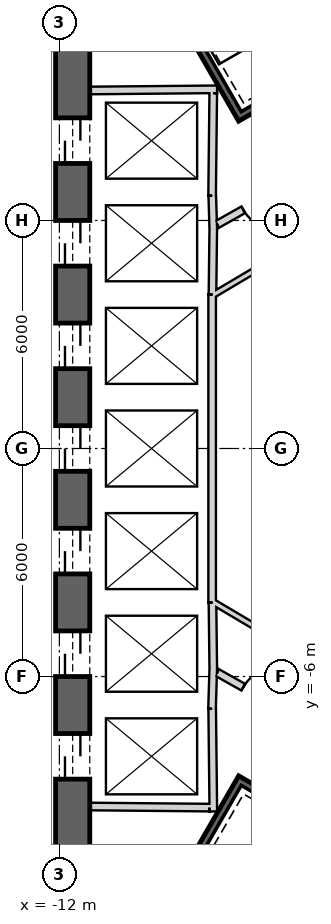
"""IFC4 building model, lengths in metres.
Left out: names, types, materials, properties, quantities, classifications, styles, units other than length and angle.
Written with IfcOpenShell. Run it as: python <this file> out.ifc"""

import sys

from ifc_helpers import new_model, si_unit, direction, frame, frame_2d, origin, place, context, subcontext, project, spatial, rectangle, extrude, element, fill, save


model = new_model("IFC4")
c1 = context("Model", 3, precision=1e-05, world=origin(), true_north=direction((0.0, 1.0)))
c2 = subcontext(c1, "Body", "Model", "MODEL_VIEW")
j1 = project(units=[si_unit("LENGTHUNIT", "METRE"), si_unit("PLANEANGLEUNIT", "RADIAN")], contexts=[c1])
p1 = place(None, origin())
s1 = spatial("IfcSite", under=j1, at=p1, CompositionType="ELEMENT")
p2 = place(p1, origin())
s2 = spatial("IfcBuilding", under=s1, at=p2, CompositionType="ELEMENT")
p3 = place(p2, frame((0.0, 0.0, 27.5)))
s3 = spatial("IfcBuildingStorey", under=s2, at=p3, CompositionType="ELEMENT", Elevation=27.5)
p4 = place(p3, frame((19.475, 2.208, 0.0), z_axis=(0.0, 0.0, 1.0), x_axis=(-0.866028369851, 0.499994862586, 0.0)))
e1 = element("IfcWall", 1, at=p4, inside=s3, PredefinedType="SHEAR", context=c2, shape_type="SweptSolid", body=[
    extrude(rectangle(XDim=31.523, YDim=0.9, at=frame_2d((15.762, 0.0))), origin(), (0.0, 0.0, 1.0), 6.0),
])
p5 = place(p4, frame((7.062, 0.0, 0.0)))
e2 = element("IfcOpeningElement", 2, at=p5, cuts=e1, PredefinedType="OPENING", context=c2, shape_type="SweptSolid", body=[
    extrude(rectangle(XDim=1.2, YDim=2.4, at=frame_2d((0.6, 1.2))), frame((0.0, 0.46, 0.0), z_axis=(0.0, -1.0, 0.0), x_axis=(1.0, 0.0, 0.0)), (0.0, 0.0, 1.0), 0.92),
])
p6 = place(p4, frame((9.762, 0.0, 0.0)))
e3 = element("IfcOpeningElement", 3, at=p6, cuts=e1, PredefinedType="OPENING", context=c2, shape_type="SweptSolid", body=[
    extrude(rectangle(XDim=1.2, YDim=2.4, at=frame_2d((0.6, 1.2))), frame((0.0, 0.46, 0.0), z_axis=(0.0, -1.0, 0.0), x_axis=(1.0, 0.0, 0.0)), (0.0, 0.0, 1.0), 0.92),
])
p7 = place(p4, frame((12.462, 0.0, 0.0)))
e4 = element("IfcOpeningElement", 4, at=p7, cuts=e1, PredefinedType="OPENING", context=c2, shape_type="SweptSolid", body=[
    extrude(rectangle(XDim=1.2, YDim=2.4, at=frame_2d((0.6, 1.2))), frame((0.0, 0.46, 0.0), z_axis=(0.0, -1.0, 0.0), x_axis=(1.0, 0.0, 0.0)), (0.0, 0.0, 1.0), 0.92),
])
p8 = place(p4, frame((15.162, 0.0, 0.0)))
e5 = element("IfcOpeningElement", 5, at=p8, cuts=e1, PredefinedType="OPENING", context=c2, shape_type="SweptSolid", body=[
    extrude(rectangle(XDim=1.2, YDim=2.4, at=frame_2d((0.6, 1.2))), frame((0.0, 0.46, 0.0), z_axis=(0.0, -1.0, 0.0), x_axis=(1.0, 0.0, 0.0)), (0.0, 0.0, 1.0), 0.92),
])
p9 = place(p4, frame((17.862, 0.0, 0.0)))
e6 = element("IfcOpeningElement", 6, at=p9, cuts=e1, PredefinedType="OPENING", context=c2, shape_type="SweptSolid", body=[
    extrude(rectangle(XDim=1.2, YDim=2.4, at=frame_2d((0.6, 1.2))), frame((0.0, 0.46, 0.0), z_axis=(0.0, -1.0, 0.0), x_axis=(1.0, 0.0, 0.0)), (0.0, 0.0, 1.0), 0.92),
])
p10 = place(p4, frame((20.562, 0.0, 0.0)))
e7 = element("IfcOpeningElement", 7, at=p10, cuts=e1, PredefinedType="OPENING", context=c2, shape_type="SweptSolid", body=[
    extrude(rectangle(XDim=1.2, YDim=2.4, at=frame_2d((0.6, 1.2))), frame((0.0, 0.46, 0.0), z_axis=(0.0, -1.0, 0.0), x_axis=(1.0, 0.0, 0.0)), (0.0, 0.0, 1.0), 0.92),
])
p11 = place(p4, frame((23.262, 0.0, 0.0)))
e8 = element("IfcOpeningElement", 8, at=p11, cuts=e1, PredefinedType="OPENING", context=c2, shape_type="SweptSolid", body=[
    extrude(rectangle(XDim=1.2, YDim=2.4, at=frame_2d((0.6, 1.2))), frame((0.0, 0.46, 0.0), z_axis=(0.0, -1.0, 0.0), x_axis=(1.0, 0.0, 0.0)), (0.0, 0.0, 1.0), 0.92),
])
p12 = place(p4, frame((3.612, 0.0, 0.0)))
e9 = element("IfcOpeningElement", 9, at=p12, cuts=e1, PredefinedType="OPENING", context=c2, shape_type="SweptSolid", body=[
    extrude(rectangle(XDim=1.2, YDim=2.4, at=frame_2d((0.6, 1.2))), frame((0.0, 0.46, 0.0), z_axis=(0.0, -1.0, 0.0), x_axis=(1.0, 0.0, 0.0)), (0.0, 0.0, 1.0), 0.92),
])
p13 = place(p4, frame((26.712, 0.0, 0.0)))
e10 = element("IfcOpeningElement", 10, at=p13, cuts=e1, PredefinedType="OPENING", context=c2, shape_type="SweptSolid", body=[
    extrude(rectangle(XDim=1.2, YDim=2.4, at=frame_2d((0.6, 1.2))), frame((0.0, 0.46, 0.0), z_axis=(0.0, -1.0, 0.0), x_axis=(1.0, 0.0, 0.0)), (0.0, 0.0, 1.0), 0.92),
])
p14 = place(p3, frame((-11.65, 15.762, 0.0), z_axis=(0.0, 0.0, 1.0), x_axis=(0.0, -1.0, 0.0)))
e11 = element("IfcWall", 11, at=p14, inside=s3, PredefinedType="SHEAR", context=c2, shape_type="SweptSolid", body=[
    extrude(rectangle(XDim=31.523, YDim=0.9, at=frame_2d((15.762, 0.0))), origin(), (0.0, 0.0, 1.0), 6.0),
])
p15 = place(p14, frame((7.062, 0.0, 0.0)))
e12 = element("IfcOpeningElement", 12, at=p15, cuts=e11, PredefinedType="OPENING", context=c2, shape_type="SweptSolid", body=[
    extrude(rectangle(XDim=1.2, YDim=2.4, at=frame_2d((0.6, 1.2))), frame((0.0, 0.46, 0.0), z_axis=(0.0, -1.0, 0.0), x_axis=(1.0, 0.0, 0.0)), (0.0, 0.0, 1.0), 0.92),
])
p16 = place(p14, frame((9.762, 0.0, 0.0)))
e13 = element("IfcOpeningElement", 13, at=p16, cuts=e11, PredefinedType="OPENING", context=c2, shape_type="SweptSolid", body=[
    extrude(rectangle(XDim=1.2, YDim=2.4, at=frame_2d((0.6, 1.2))), frame((0.0, 0.46, 0.0), z_axis=(0.0, -1.0, 0.0), x_axis=(1.0, 0.0, 0.0)), (0.0, 0.0, 1.0), 0.92),
])
p17 = place(p14, frame((12.462, 0.0, 0.0)))
e14 = element("IfcOpeningElement", 14, at=p17, cuts=e11, PredefinedType="OPENING", context=c2, shape_type="SweptSolid", body=[
    extrude(rectangle(XDim=1.2, YDim=2.4, at=frame_2d((0.6, 1.2))), frame((0.0, 0.46, 0.0), z_axis=(0.0, -1.0, 0.0), x_axis=(1.0, 0.0, 0.0)), (0.0, 0.0, 1.0), 0.92),
])
p18 = place(p14, frame((15.162, 0.0, 0.0)))
e15 = element("IfcOpeningElement", 15, at=p18, cuts=e11, PredefinedType="OPENING", context=c2, shape_type="SweptSolid", body=[
    extrude(rectangle(XDim=1.2, YDim=2.4, at=frame_2d((0.6, 1.2))), frame((0.0, 0.46, 0.0), z_axis=(0.0, -1.0, 0.0), x_axis=(1.0, 0.0, 0.0)), (0.0, 0.0, 1.0), 0.92),
])
p19 = place(p14, frame((17.862, 0.0, 0.0)))
e16 = element("IfcOpeningElement", 16, at=p19, cuts=e11, PredefinedType="OPENING", context=c2, shape_type="SweptSolid", body=[
    extrude(rectangle(XDim=1.2, YDim=2.4, at=frame_2d((0.6, 1.2))), frame((0.0, 0.46, 0.0), z_axis=(0.0, -1.0, 0.0), x_axis=(1.0, 0.0, 0.0)), (0.0, 0.0, 1.0), 0.92),
])
p20 = place(p14, frame((20.562, 0.0, 0.0)))
e17 = element("IfcOpeningElement", 17, at=p20, cuts=e11, PredefinedType="OPENING", context=c2, shape_type="SweptSolid", body=[
    extrude(rectangle(XDim=1.2, YDim=2.4, at=frame_2d((0.6, 1.2))), frame((0.0, 0.46, 0.0), z_axis=(0.0, -1.0, 0.0), x_axis=(1.0, 0.0, 0.0)), (0.0, 0.0, 1.0), 0.92),
])
p21 = place(p14, frame((23.262, 0.0, 0.0)))
e18 = element("IfcOpeningElement", 18, at=p21, cuts=e11, PredefinedType="OPENING", context=c2, shape_type="SweptSolid", body=[
    extrude(rectangle(XDim=1.2, YDim=2.4, at=frame_2d((0.6, 1.2))), frame((0.0, 0.46, 0.0), z_axis=(0.0, -1.0, 0.0), x_axis=(1.0, 0.0, 0.0)), (0.0, 0.0, 1.0), 0.92),
])
p22 = place(p14, frame((3.612, 0.0, 0.0)))
e19 = element("IfcOpeningElement", 19, at=p22, cuts=e11, PredefinedType="OPENING", context=c2, shape_type="SweptSolid", body=[
    extrude(rectangle(XDim=1.2, YDim=2.4, at=frame_2d((0.6, 1.2))), frame((0.0, 0.46, 0.0), z_axis=(0.0, -1.0, 0.0), x_axis=(1.0, 0.0, 0.0)), (0.0, 0.0, 1.0), 0.92),
])
p23 = place(p14, frame((26.712, 0.0, 0.0)))
e20 = element("IfcOpeningElement", 20, at=p23, cuts=e11, PredefinedType="OPENING", context=c2, shape_type="SweptSolid", body=[
    extrude(rectangle(XDim=1.2, YDim=2.4, at=frame_2d((0.6, 1.2))), frame((0.0, 0.46, 0.0), z_axis=(0.0, -1.0, 0.0), x_axis=(1.0, 0.0, 0.0)), (0.0, 0.0, 1.0), 0.92),
])
p24 = place(p3, frame((-7.825, -17.97, 0.0), z_axis=(0.0, 0.0, 1.0), x_axis=(0.866028369851, 0.499994862586, 0.0)))
e21 = element("IfcWall", 21, at=p24, inside=s3, PredefinedType="SHEAR", context=c2, shape_type="SweptSolid", body=[
    extrude(rectangle(XDim=31.523, YDim=0.9, at=frame_2d((15.762, 0.0))), origin(), (0.0, 0.0, 1.0), 6.0),
])
p25 = place(p24, frame((7.062, 0.0, 0.0)))
e22 = element("IfcOpeningElement", 22, at=p25, cuts=e21, PredefinedType="OPENING", context=c2, shape_type="SweptSolid", body=[
    extrude(rectangle(XDim=1.2, YDim=2.4, at=frame_2d((0.6, 1.2))), frame((0.0, 0.46, 0.0), z_axis=(0.0, -1.0, 0.0), x_axis=(1.0, 0.0, 0.0)), (0.0, 0.0, 1.0), 0.92),
])
p26 = place(p24, frame((9.762, 0.0, 0.0)))
e23 = element("IfcOpeningElement", 23, at=p26, cuts=e21, PredefinedType="OPENING", context=c2, shape_type="SweptSolid", body=[
    extrude(rectangle(XDim=1.2, YDim=2.4, at=frame_2d((0.6, 1.2))), frame((0.0, 0.46, 0.0), z_axis=(0.0, -1.0, 0.0), x_axis=(1.0, 0.0, 0.0)), (0.0, 0.0, 1.0), 0.92),
])
p27 = place(p24, frame((12.462, 0.0, 0.0)))
e24 = element("IfcOpeningElement", 24, at=p27, cuts=e21, PredefinedType="OPENING", context=c2, shape_type="SweptSolid", body=[
    extrude(rectangle(XDim=1.2, YDim=2.4, at=frame_2d((0.6, 1.2))), frame((0.0, 0.46, 0.0), z_axis=(0.0, -1.0, 0.0), x_axis=(1.0, 0.0, 0.0)), (0.0, 0.0, 1.0), 0.92),
])
p28 = place(p24, frame((15.162, 0.0, 0.0)))
e25 = element("IfcOpeningElement", 25, at=p28, cuts=e21, PredefinedType="OPENING", context=c2, shape_type="SweptSolid", body=[
    extrude(rectangle(XDim=1.2, YDim=2.4, at=frame_2d((0.6, 1.2))), frame((0.0, 0.46, 0.0), z_axis=(0.0, -1.0, 0.0), x_axis=(1.0, 0.0, 0.0)), (0.0, 0.0, 1.0), 0.92),
])
p29 = place(p24, frame((17.862, 0.0, 0.0)))
e26 = element("IfcOpeningElement", 26, at=p29, cuts=e21, PredefinedType="OPENING", context=c2, shape_type="SweptSolid", body=[
    extrude(rectangle(XDim=1.2, YDim=2.4, at=frame_2d((0.6, 1.2))), frame((0.0, 0.46, 0.0), z_axis=(0.0, -1.0, 0.0), x_axis=(1.0, 0.0, 0.0)), (0.0, 0.0, 1.0), 0.92),
])
p30 = place(p24, frame((20.562, 0.0, 0.0)))
e27 = element("IfcOpeningElement", 27, at=p30, cuts=e21, PredefinedType="OPENING", context=c2, shape_type="SweptSolid", body=[
    extrude(rectangle(XDim=1.2, YDim=2.4, at=frame_2d((0.6, 1.2))), frame((0.0, 0.46, 0.0), z_axis=(0.0, -1.0, 0.0), x_axis=(1.0, 0.0, 0.0)), (0.0, 0.0, 1.0), 0.92),
])
p31 = place(p24, frame((26.712, 0.0, 0.0)))
e28 = element("IfcOpeningElement", 28, at=p31, cuts=e21, PredefinedType="OPENING", context=c2, shape_type="SweptSolid", body=[
    extrude(rectangle(XDim=1.2, YDim=2.4, at=frame_2d((0.6, 1.2))), frame((0.0, 0.46, 0.0), z_axis=(0.0, -1.0, 0.0), x_axis=(1.0, 0.0, 0.0)), (0.0, 0.0, 1.0), 0.92),
])
p32 = place(p24, frame((3.612, 0.0, 0.0)))
e29 = element("IfcOpeningElement", 29, at=p32, cuts=e21, PredefinedType="OPENING", context=c2, shape_type="SweptSolid", body=[
    extrude(rectangle(XDim=1.2, YDim=2.4, at=frame_2d((0.6, 1.2))), frame((0.0, 0.46, 0.0), z_axis=(0.0, -1.0, 0.0), x_axis=(1.0, 0.0, 0.0)), (0.0, 0.0, 1.0), 0.92),
])
p33 = place(p3, frame((-11.2, 9.42, 0.0), z_axis=(0.0, 0.0, 1.0), x_axis=(0.999957167047, 0.009255488683, 0.0)))
e30 = element("IfcWall", 30, at=p33, inside=s3, PredefinedType="PLUMBINGWALL", context=c2, shape_type="SweptSolid", body=[
    extrude(rectangle(XDim=3.35, YDim=0.2, at=frame_2d((1.675, 0.0))), origin(), (0.0, 0.0, 1.0), 5.7),
])
p34 = place(p3, frame((-7.951, 9.35, 0.0), z_axis=(0.0, 0.0, 1.0), x_axis=(-0.011120469654, -0.999938165666, 0.0)))
e31 = element("IfcWall", 31, at=p34, inside=s3, PredefinedType="PLUMBINGWALL", context=c2, shape_type="SweptSolid", body=[
    extrude(rectangle(XDim=2.7, YDim=0.2, at=frame_2d((1.35, 0.0))), origin(), (0.0, 0.0, 1.0), 5.7),
])
p35 = place(p3, frame((-7.977, 6.65, 0.0), z_axis=(0.0, 0.0, 1.0), x_axis=(0.030861509705, -0.999523670164, 0.0)))
e32 = element("IfcWall", 32, at=p35, inside=s3, PredefinedType="PLUMBINGWALL", context=c2, shape_type="SweptSolid", body=[
    extrude(rectangle(XDim=0.878, YDim=0.2, at=frame_2d((0.439, 0.0))), origin(), (0.0, 0.0, 1.0), 5.7),
])
p36 = place(p3, frame((-7.949, 5.895, 0.0), z_axis=(0.0, 0.0, 1.0), x_axis=(-0.012042535896, -0.999927486035, 0.0)))
e33 = element("IfcWall", 33, at=p36, inside=s3, PredefinedType="PLUMBINGWALL", context=c2, shape_type="SweptSolid", body=[
    extrude(rectangle(XDim=1.845, YDim=0.2, at=frame_2d((0.922, 0.0))), origin(), (0.0, 0.0, 1.0), 5.7),
])
p37 = place(p3, frame((-7.98, 4.05, 0.0), z_axis=(0.0, 0.0, 1.0), x_axis=(0.0, -1.0, 0.0)))
e34 = element("IfcWall", 34, at=p37, inside=s3, PredefinedType="PLUMBINGWALL", context=c2, shape_type="SweptSolid", body=[
    extrude(rectangle(XDim=8.1, YDim=0.2, at=frame_2d((4.05, 0.0))), origin(), (0.0, 0.0, 1.0), 5.7),
])
p38 = place(p3, frame((-7.95, -5.772, 0.0), z_axis=(0.0, 0.0, 1.0), x_axis=(-0.030803413295, -0.999525462272, 0.0)))
e35 = element("IfcWall", 35, at=p38, inside=s3, PredefinedType="PLUMBINGWALL", context=c2, shape_type="SweptSolid", body=[
    extrude(rectangle(XDim=1.078, YDim=0.2, at=frame_2d((0.539, 0.0))), origin(), (0.0, 0.0, 1.0), 5.7),
])
p39 = place(p3, frame((-7.971, -4.05, 0.0), z_axis=(0.0, 0.0, 1.0), x_axis=(0.012042535896, -0.999927486035, 0.0)))
e36 = element("IfcWall", 36, at=p39, inside=s3, PredefinedType="PLUMBINGWALL", context=c2, shape_type="SweptSolid", body=[
    extrude(rectangle(XDim=1.845, YDim=0.2, at=frame_2d((0.922, 0.0))), origin(), (0.0, 0.0, 1.0), 5.7),
])
p40 = place(p3, frame((-7.979, -6.85, 0.0), z_axis=(0.0, 0.0, 1.0), x_axis=(0.011121475088, -0.999938154483, 0.0)))
e37 = element("IfcWall", 37, at=p40, inside=s3, PredefinedType="PLUMBINGWALL", context=c2, shape_type="SweptSolid", body=[
    extrude(rectangle(XDim=2.7, YDim=0.2, at=frame_2d((1.35, 0.0))), origin(), (0.0, 0.0, 1.0), 5.7),
])
p41 = place(p3, frame((-8.05, -9.449, 0.0), z_axis=(0.0, 0.0, 1.0), x_axis=(-0.999957467379, 0.009222983926, 0.0)))
e38 = element("IfcWall", 38, at=p41, inside=s3, PredefinedType="PLUMBINGWALL", context=c2, shape_type="SweptSolid", body=[
    extrude(rectangle(XDim=3.15, YDim=0.2, at=frame_2d((1.575, 0.0))), origin(), (0.0, 0.0, 1.0), 5.7),
])
p42 = place(p3, frame((-11.245, 15.678, -0.3), z_axis=(0.0, 0.0, 1.0), x_axis=(0.499977274689, -0.866038523851, 0.0)))
e39 = element("IfcWall", 39, at=p42, inside=s3, PredefinedType="SHEAR", context=c2, shape_type="SweptSolid", body=[
    extrude(rectangle(XDim=8.1, YDim=0.2, at=frame_2d((4.05, 0.0))), origin(), (0.0, 0.0, 1.0), 6.0),
])
p43 = place(p3, frame((-7.159, 8.8, -0.3), z_axis=(0.0, 0.0, 1.0), x_axis=(0.866047807691, 0.499961193289, 0.0)))
e40 = element("IfcWall", 40, at=p43, inside=s3, PredefinedType="SHEAR", context=c2, shape_type="SweptSolid", body=[
    extrude(rectangle(XDim=3.6, YDim=0.2, at=frame_2d((1.8, 0.0))), origin(), (0.0, 0.0, 1.0), 6.0),
])
p44 = place(p43, frame((1.25, 0.0, 0.3)))
e41 = element("IfcOpeningElement", 41, at=p44, cuts=e40, PredefinedType="OPENING", context=c2, shape_type="SweptSolid", body=[
    extrude(rectangle(XDim=1.1, YDim=2.1, at=frame_2d((0.55, 1.05))), frame((0.0, 0.11, 0.0), z_axis=(0.0, -1.0, 0.0), x_axis=(1.0, 0.0, 0.0)), (0.0, 0.0, 1.0), 0.22),
])
p45 = place(p3, frame((-7.196, -8.663, -0.3), z_axis=(0.0, 0.0, 1.0), x_axis=(-0.499997992926, -0.866026562566, 0.0)))
e42 = element("IfcWall", 42, at=p45, inside=s3, PredefinedType="SHEAR", context=c2, shape_type="SweptSolid", body=[
    extrude(rectangle(XDim=7.9, YDim=0.2, at=frame_2d((3.95, 0.0))), origin(), (0.0, 0.0, 1.0), 6.0),
])
p46 = place(p3, frame((-4.041, -10.599, -0.3), z_axis=(0.0, 0.0, 1.0), x_axis=(-0.866047807691, 0.499961193289, 0.0)))
e43 = element("IfcWall", 43, at=p46, inside=s3, PredefinedType="SHEAR", context=c2, shape_type="SweptSolid", body=[
    extrude(rectangle(XDim=3.6, YDim=0.2, at=frame_2d((1.8, 0.0))), origin(), (0.0, 0.0, 1.0), 6.0),
])
p47 = place(p46, frame((1.25, 0.0, 0.3)))
e44 = element("IfcOpeningElement", 44, at=p47, cuts=e43, PredefinedType="OPENING", context=c2, shape_type="SweptSolid", body=[
    extrude(rectangle(XDim=1.1, YDim=2.1, at=frame_2d((0.55, 1.05))), frame((0.0, 0.11, 0.0), z_axis=(0.0, -1.0, 0.0), x_axis=(1.0, 0.0, 0.0)), (0.0, 0.0, 1.0), 0.22),
])
p48 = place(p3, frame((-5.6, 7.16, 0.0), z_axis=(0.0, 0.0, 1.0), x_axis=(-0.871363259478, -0.490638431059, 0.0)))
e45 = element("IfcWall", 45, at=p48, inside=s3, PredefinedType="PARTITIONING", context=c2, shape_type="SweptSolid", body=[
    extrude(rectangle(XDim=2.581, YDim=0.2, at=frame_2d((1.291, 0.0))), origin(), (0.0, 0.0, 1.0), 5.7),
])
p49 = place(p48, frame((0.791, 0.0, 0.0)))
e46 = element("IfcOpeningElement", 46, at=p49, cuts=e45, PredefinedType="OPENING", context=c2, shape_type="SweptSolid", body=[
    extrude(rectangle(XDim=1.0, YDim=2.1, at=frame_2d((0.5, 1.05))), frame((0.0, 0.11, 0.0), z_axis=(0.0, -1.0, 0.0), x_axis=(1.0, 0.0, 0.0)), (0.0, 0.0, 1.0), 0.22),
])
p50 = place(p3, frame((-7.849, -5.894, 0.0), z_axis=(0.0, 0.0, 1.0), x_axis=(0.871363259478, -0.490638431059, 0.0)))
e47 = element("IfcWall", 47, at=p50, inside=s3, PredefinedType="PARTITIONING", context=c2, shape_type="SweptSolid", body=[
    extrude(rectangle(XDim=2.581, YDim=0.2, at=frame_2d((1.291, 0.0))), origin(), (0.0, 0.0, 1.0), 5.7),
])
p51 = place(p50, frame((0.791, 0.0, 0.0)))
e48 = element("IfcOpeningElement", 48, at=p51, cuts=e47, PredefinedType="OPENING", context=c2, shape_type="SweptSolid", body=[
    extrude(rectangle(XDim=1.0, YDim=2.1, at=frame_2d((0.5, 1.05))), frame((0.0, 0.11, 0.0), z_axis=(0.0, -1.0, 0.0), x_axis=(1.0, 0.0, 0.0)), (0.0, 0.0, 1.0), 0.22),
])
p52 = place(p3, frame((-6.024, 5.183, 0.0), z_axis=(0.0, 0.0, 1.0), x_axis=(-0.860126804455, -0.510080268447, 0.0)))
e49 = element("IfcWall", 49, at=p52, inside=s3, PredefinedType="PLUMBINGWALL", context=c2, shape_type="SweptSolid", body=[
    extrude(rectangle(XDim=2.24, YDim=0.15, at=frame_2d((1.12, 0.0))), origin(), (0.0, 0.0, 1.0), 5.7),
])
p53 = place(p3, frame((-7.95, -4.041, 0.0), z_axis=(0.0, 0.0, 1.0), x_axis=(0.860090281069, -0.510141851263, 0.0)))
e50 = element("IfcWall", 50, at=p53, inside=s3, PredefinedType="PLUMBINGWALL", context=c2, shape_type="SweptSolid", body=[
    extrude(rectangle(XDim=2.089, YDim=0.15, at=frame_2d((1.045, 0.0))), origin(), (0.0, 0.0, 1.0), 5.7),
])
p54 = place(p49, origin())
e51 = element("IfcDoor", 51, at=p54, inside=s3, OperationType="SINGLE_SWING_LEFT", PredefinedType="USERDEFINED", context=c2, shape_type="SweptSolid", body=[
    extrude(rectangle(XDim=1.0, YDim=2.1, at=frame_2d((0.5, 1.05))), frame((0.0, 0.025, 0.0), z_axis=(0.0, -1.0, 0.0), x_axis=(1.0, 0.0, 0.0)), (0.0, 0.0, 1.0), 0.05),
])
fill(e46, e51)
p55 = place(p51, origin())
e52 = element("IfcDoor", 52, at=p55, inside=s3, OperationType="SINGLE_SWING_RIGHT", PredefinedType="USERDEFINED", context=c2, shape_type="SweptSolid", body=[
    extrude(rectangle(XDim=1.0, YDim=2.1, at=frame_2d((0.5, 1.05))), frame((0.0, 0.025, 0.0), z_axis=(0.0, -1.0, 0.0), x_axis=(1.0, 0.0, 0.0)), (0.0, 0.0, 1.0), 0.05),
])
fill(e48, e52)
p56 = place(p15, origin())
e53 = element("IfcDoor", 53, at=p56, inside=s3, OperationType="SLIDING_TO_LEFT", PredefinedType="USERDEFINED", context=c2, shape_type="SweptSolid", body=[
    extrude(rectangle(XDim=1.2, YDim=2.4, at=frame_2d((0.6, 1.2))), frame((0.0, 0.025, 0.0), z_axis=(0.0, -1.0, 0.0), x_axis=(1.0, 0.0, 0.0)), (0.0, 0.0, 1.0), 0.05),
])
fill(e12, e53)
p57 = place(p16, origin())
e54 = element("IfcDoor", 54, at=p57, inside=s3, OperationType="SLIDING_TO_LEFT", PredefinedType="USERDEFINED", context=c2, shape_type="SweptSolid", body=[
    extrude(rectangle(XDim=1.2, YDim=2.4, at=frame_2d((0.6, 1.2))), frame((0.0, 0.025, 0.0), z_axis=(0.0, -1.0, 0.0), x_axis=(1.0, 0.0, 0.0)), (0.0, 0.0, 1.0), 0.05),
])
fill(e13, e54)
p58 = place(p17, origin())
e55 = element("IfcDoor", 55, at=p58, inside=s3, OperationType="SLIDING_TO_LEFT", PredefinedType="USERDEFINED", context=c2, shape_type="SweptSolid", body=[
    extrude(rectangle(XDim=1.2, YDim=2.4, at=frame_2d((0.6, 1.2))), frame((0.0, 0.025, 0.0), z_axis=(0.0, -1.0, 0.0), x_axis=(1.0, 0.0, 0.0)), (0.0, 0.0, 1.0), 0.05),
])
fill(e14, e55)
p59 = place(p18, origin())
e56 = element("IfcDoor", 56, at=p59, inside=s3, OperationType="SLIDING_TO_LEFT", PredefinedType="USERDEFINED", context=c2, shape_type="SweptSolid", body=[
    extrude(rectangle(XDim=1.2, YDim=2.4, at=frame_2d((0.6, 1.2))), frame((0.0, 0.025, 0.0), z_axis=(0.0, -1.0, 0.0), x_axis=(1.0, 0.0, 0.0)), (0.0, 0.0, 1.0), 0.05),
])
fill(e15, e56)
p60 = place(p19, origin())
e57 = element("IfcDoor", 57, at=p60, inside=s3, OperationType="SLIDING_TO_LEFT", PredefinedType="USERDEFINED", context=c2, shape_type="SweptSolid", body=[
    extrude(rectangle(XDim=1.2, YDim=2.4, at=frame_2d((0.6, 1.2))), frame((0.0, 0.025, 0.0), z_axis=(0.0, -1.0, 0.0), x_axis=(1.0, 0.0, 0.0)), (0.0, 0.0, 1.0), 0.05),
])
fill(e16, e57)
p61 = place(p20, origin())
e58 = element("IfcDoor", 58, at=p61, inside=s3, OperationType="SLIDING_TO_LEFT", PredefinedType="USERDEFINED", context=c2, shape_type="SweptSolid", body=[
    extrude(rectangle(XDim=1.2, YDim=2.4, at=frame_2d((0.6, 1.2))), frame((0.0, 0.025, 0.0), z_axis=(0.0, -1.0, 0.0), x_axis=(1.0, 0.0, 0.0)), (0.0, 0.0, 1.0), 0.05),
])
fill(e17, e58)
p62 = place(p21, origin())
e59 = element("IfcDoor", 59, at=p62, inside=s3, OperationType="SLIDING_TO_LEFT", PredefinedType="USERDEFINED", context=c2, shape_type="SweptSolid", body=[
    extrude(rectangle(XDim=1.2, YDim=2.4, at=frame_2d((0.6, 1.2))), frame((0.0, 0.025, 0.0), z_axis=(0.0, -1.0, 0.0), x_axis=(1.0, 0.0, 0.0)), (0.0, 0.0, 1.0), 0.05),
])
fill(e18, e59)
save(model, sys.argv[1])
